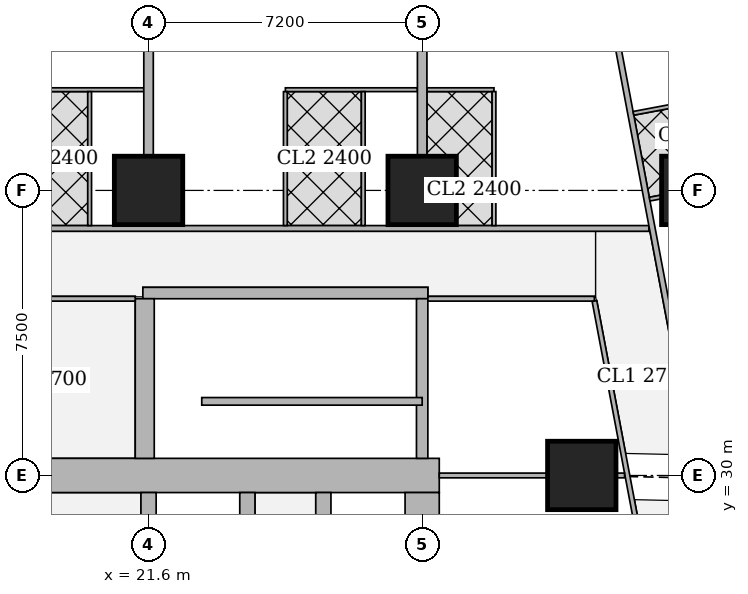
"""IFC4 building model, lengths in metres.
Left out: names, types, materials, properties, quantities, classifications, styles, units other than length and angle.
Written with IfcOpenShell. Run it as: python <this file> out.ifc"""

import sys

from ifc_helpers import new_model, si_unit, direction, frame, frame_2d, origin, origin_2d, place, context, subcontext, project, spatial, rectangle, extrude, element, fill, save


model = new_model("IFC4")
c1 = context("Model", 3, precision=1e-05, world=origin(), true_north=direction((0.0, 1.0)))
c2 = subcontext(c1, "Body", "Model", "MODEL_VIEW")
j1 = project(units=[si_unit("LENGTHUNIT", "METRE"), si_unit("PLANEANGLEUNIT", "RADIAN")], contexts=[c1])
p1 = place(None, origin())
s1 = spatial("IfcSite", under=j1, at=p1, CompositionType="ELEMENT")
p2 = place(p1, origin())
s2 = spatial("IfcBuilding", under=s1, at=p2, CompositionType="ELEMENT")
p3 = place(p2, frame((0.0, 0.0, 42.5)))
s3 = spatial("IfcBuildingStorey", under=s2, at=p3, CompositionType="ELEMENT", Elevation=42.5)
for number, where, z_axis, x_axis in (
    (1, (33.0, 30.0, 0.0), (0.0, 0.0, 1.0), (1.0, 0.0, 0.0)),
    (2, (21.6, 37.5, 0.0), (0.0, 0.0, 1.0), (1.0, 0.0, 0.0)),
    (3, (28.8, 37.5, 0.0), (0.0, 0.0, 1.0), (1.0, 0.0, 0.0)),
    (4, (36.0, 37.5, 0.0), (0.0, 0.0, 1.0), (1.0, 0.0, 0.0)),
):
    element("IfcColumn", number, at=place(p3, frame(where, z_axis=z_axis, x_axis=x_axis)), inside=s3, PredefinedType="COLUMN", context=c2, shape_type="SweptSolid", body=[
        extrude(rectangle(XDim=1.8, YDim=1.8, at=origin_2d()), origin(), (0.0, 0.0, 1.0), 3.75),
    ])
p4 = place(p3, frame((13.95, 30.0, 0.0), z_axis=(0.0, 0.0, 1.0), x_axis=(1.0, 0.0, 0.0)))
e5 = element("IfcWall", 5, at=p4, inside=s3, PredefinedType="SHEAR", context=c2, shape_type="SweptSolid", body=[
    extrude(rectangle(XDim=15.3, YDim=0.9, at=frame_2d((7.65, 0.0))), origin(), (0.0, 0.0, 1.0), 3.75),
])
p5 = place(p4, frame((4.45, 0.0, 0.0)))
e6 = element("IfcOpeningElement", 6, at=p5, cuts=e5, PredefinedType="OPENING", context=c2, shape_type="SweptSolid", body=[
    extrude(rectangle(XDim=1.8, YDim=2.1, at=frame_2d((0.9, 1.05))), frame((0.0, 0.46, 0.0), z_axis=(0.0, -1.0, 0.0), x_axis=(1.0, 0.0, 0.0)), (0.0, 0.0, 1.0), 0.92),
])
p6 = place(p4, frame((10.7, 0.0, 0.0)))
e7 = element("IfcOpeningElement", 7, at=p6, cuts=e5, PredefinedType="OPENING", context=c2, shape_type="SweptSolid", body=[
    extrude(rectangle(XDim=1.1, YDim=2.1, at=frame_2d((0.55, 1.05))), frame((0.0, 0.46, 0.0), z_axis=(0.0, -1.0, 0.0), x_axis=(1.0, 0.0, 0.0)), (0.0, 0.0, 1.0), 0.92),
])
p7 = place(p3, frame((28.8, 15.45, 0.0), z_axis=(0.0, 0.0, 1.0), x_axis=(0.0, 1.0, 0.0)))
e8 = element("IfcWall", 8, at=p7, inside=s3, PredefinedType="SHEAR", context=c2, shape_type="SweptSolid", body=[
    extrude(rectangle(XDim=14.1, YDim=0.9, at=frame_2d((7.05, 0.0))), origin(), (0.0, 0.0, 1.0), 3.75),
])
for number, where, z_axis, x_axis in (
    (9, (21.6, 15.45, 0.0), (0.0, 0.0, 1.0), (0.0, 1.0, 0.0)),
    (10, (24.2, 15.45, 0.0), (0.0, 0.0, 1.0), (0.0, 1.0, 0.0)),
):
    element("IfcWall", number, at=place(p3, frame(where, z_axis=z_axis, x_axis=x_axis)), inside=s3, PredefinedType="SHEAR", context=c2, shape_type="SweptSolid", body=[
        extrude(rectangle(XDim=14.1, YDim=0.4, at=frame_2d((7.05, 0.0))), origin(), (0.0, 0.0, 1.0), 3.75),
    ])
p8 = place(p3, frame((26.2, 26.45, 0.0), z_axis=(0.0, 0.0, 1.0), x_axis=(0.0, 1.0, 0.0)))
e11 = element("IfcWall", 11, at=p8, inside=s3, PredefinedType="SHEAR", context=c2, shape_type="SweptSolid", body=[
    extrude(rectangle(XDim=3.1, YDim=0.4, at=frame_2d((1.55, 0.0))), origin(), (0.0, 0.0, 1.0), 3.75),
])
p9 = place(p8, frame((1.075, 0.0, 0.0)))
e12 = element("IfcOpeningElement", 12, at=p9, cuts=e11, PredefinedType="OPENING", context=c2, shape_type="SweptSolid", body=[
    extrude(rectangle(XDim=1.2, YDim=2.1, at=frame_2d((0.6, 1.05))), frame((0.0, 0.21, 0.0), z_axis=(0.0, -1.0, 0.0), x_axis=(1.0, 0.0, 0.0)), (0.0, 0.0, 1.0), 0.42),
])
p10 = place(p3, frame((21.45, 34.8, 0.0), z_axis=(0.0, 0.0, 1.0), x_axis=(1.0, 0.0, 0.0)))
e13 = element("IfcWall", 13, at=p10, inside=s3, PredefinedType="SHEAR", context=c2, shape_type="SweptSolid", body=[
    extrude(rectangle(XDim=7.5, YDim=0.3, at=frame_2d((3.75, 0.0))), origin(), (0.0, 0.0, 1.0), 3.75),
])
p11 = place(p10, frame((0.5, 0.0, 0.0)))
e14 = element("IfcOpeningElement", 14, at=p11, cuts=e13, PredefinedType="OPENING", context=c2, shape_type="SweptSolid", body=[
    extrude(rectangle(XDim=1.1, YDim=2.1, at=frame_2d((0.55, 1.05))), frame((0.0, 0.16, 0.0), z_axis=(0.0, -1.0, 0.0), x_axis=(1.0, 0.0, 0.0)), (0.0, 0.0, 1.0), 0.32),
])
p12 = place(p3, frame((21.5, 30.45, 0.0), z_axis=(0.0, 0.0, 1.0), x_axis=(0.0, 1.0, 0.0)))
e15 = element("IfcWall", 15, at=p12, inside=s3, PredefinedType="SHEAR", context=c2, shape_type="SweptSolid", body=[
    extrude(rectangle(XDim=4.2, YDim=0.5, at=frame_2d((2.1, 0.0))), origin(), (0.0, 0.0, 1.0), 3.75),
])
p13 = place(p3, frame((28.8, 30.45, 0.0), z_axis=(0.0, 0.0, 1.0), x_axis=(0.0, 1.0, 0.0)))
e16 = element("IfcWall", 16, at=p13, inside=s3, PredefinedType="SHEAR", context=c2, shape_type="SweptSolid", body=[
    extrude(rectangle(XDim=4.2, YDim=0.3, at=frame_2d((2.1, 0.0))), origin(), (0.0, 0.0, 1.0), 3.75),
])
p14 = place(p3, frame((8.35, 36.5, 0.0), z_axis=(0.0, 0.0, 1.0), x_axis=(1.0, 0.0, 0.0)))
e17 = element("IfcWall", 17, at=p14, inside=s3, PredefinedType="SOLIDWALL", context=c2, shape_type="SweptSolid", body=[
    extrude(rectangle(XDim=26.415, YDim=0.15, at=frame_2d((13.208, 0.0))), origin(), (0.0, 0.0, 1.0), 3.5),
])
p15 = place(p14, frame((3.383, 0.0, 0.0)))
e18 = element("IfcOpeningElement", 18, at=p15, cuts=e17, PredefinedType="OPENING", context=c2, shape_type="SweptSolid", body=[
    extrude(rectangle(XDim=1.0, YDim=2.1, at=frame_2d((0.5, 1.05))), frame((0.0, 0.085, 0.0), z_axis=(0.0, -1.0, 0.0), x_axis=(1.0, 0.0, 0.0)), (0.0, 0.0, 1.0), 0.17),
])
p16 = place(p14, frame((7.65, 0.0, 0.0)))
e19 = element("IfcOpeningElement", 19, at=p16, cuts=e17, PredefinedType="OPENING", context=c2, shape_type="SweptSolid", body=[
    extrude(rectangle(XDim=1.0, YDim=2.1, at=frame_2d((0.5, 1.05))), frame((0.0, 0.085, 0.0), z_axis=(0.0, -1.0, 0.0), x_axis=(1.0, 0.0, 0.0)), (0.0, 0.0, 1.0), 0.17),
])
p17 = place(p14, frame((14.85, 0.0, 0.0)))
e20 = element("IfcOpeningElement", 20, at=p17, cuts=e17, PredefinedType="OPENING", context=c2, shape_type="SweptSolid", body=[
    extrude(rectangle(XDim=1.0, YDim=2.1, at=frame_2d((0.5, 1.05))), frame((0.0, 0.085, 0.0), z_axis=(0.0, -1.0, 0.0), x_axis=(1.0, 0.0, 0.0)), (0.0, 0.0, 1.0), 0.17),
])
p18 = place(p14, frame((23.923, 0.0, 0.0)))
e21 = element("IfcOpeningElement", 21, at=p18, cuts=e17, PredefinedType="OPENING", context=c2, shape_type="SweptSolid", body=[
    extrude(rectangle(XDim=1.0, YDim=2.1, at=frame_2d((0.5, 1.05))), frame((0.0, 0.085, 0.0), z_axis=(0.0, -1.0, 0.0), x_axis=(1.0, 0.0, 0.0)), (0.0, 0.0, 1.0), 0.17),
])
p19 = place(p3, frame((33.68, 42.723, 0.0), z_axis=(0.0, 0.0, 1.0), x_axis=(0.185624129307, -0.98262082342, 0.0)))
e22 = element("IfcWall", 22, at=p19, inside=s3, PredefinedType="SOLIDWALL", context=c2, shape_type="SweptSolid", body=[
    extrude(rectangle(XDim=41.051, YDim=0.15, at=frame_2d((20.526, 0.0))), origin(), (0.0, 0.0, 1.0), 2.5),
])
p20 = place(p19, frame((7.73, 0.0, 0.0)))
e23 = element("IfcOpeningElement", 23, at=p20, cuts=e22, PredefinedType="OPENING", context=c2, shape_type="SweptSolid", body=[
    extrude(rectangle(XDim=1.0, YDim=2.1, at=frame_2d((0.5, 1.05))), frame((0.0, 0.085, 0.0), z_axis=(0.0, -1.0, 0.0), x_axis=(1.0, 0.0, 0.0)), (0.0, 0.0, 1.0), 0.17),
])
p21 = place(p19, frame((12.307, 0.0, 0.0)))
e24 = element("IfcOpeningElement", 24, at=p21, cuts=e22, PredefinedType="OPENING", context=c2, shape_type="SweptSolid", body=[
    extrude(rectangle(XDim=1.0, YDim=2.1, at=frame_2d((0.5, 1.05))), frame((0.0, 0.085, 0.0), z_axis=(0.0, -1.0, 0.0), x_axis=(1.0, 0.0, 0.0)), (0.0, 0.0, 1.0), 0.17),
])
p22 = place(p19, frame((19.938, 0.0, 0.0)))
e25 = element("IfcOpeningElement", 25, at=p22, cuts=e22, PredefinedType="OPENING", context=c2, shape_type="SweptSolid", body=[
    extrude(rectangle(XDim=1.0, YDim=2.1, at=frame_2d((0.5, 1.05))), frame((0.0, 0.085, 0.0), z_axis=(0.0, -1.0, 0.0), x_axis=(1.0, 0.0, 0.0)), (0.0, 0.0, 1.0), 0.17),
])
p23 = place(p19, frame((32.193, 0.0, 0.0)))
e26 = element("IfcOpeningElement", 26, at=p23, cuts=e22, PredefinedType="OPENING", context=c2, shape_type="SweptSolid", body=[
    extrude(rectangle(XDim=1.0, YDim=2.1, at=frame_2d((0.5, 1.05))), frame((0.0, 0.085, 0.0), z_axis=(0.0, -1.0, 0.0), x_axis=(1.0, 0.0, 0.0)), (0.0, 0.0, 1.0), 0.17),
])
p24 = place(p3, frame((37.823, 40.182, 0.0), z_axis=(0.0, 0.0, 1.0), x_axis=(-0.98263926043, -0.185526504472, 0.0)))
e27 = element("IfcWall", 27, at=p24, inside=s3, PredefinedType="PARTITIONING", context=c2, shape_type="SweptSolid", body=[
    extrude(rectangle(XDim=3.524, YDim=0.1, at=frame_2d((1.762, 0.0))), origin(), (0.0, 0.0, 1.0), 3.5),
])
p25 = place(p3, frame((35.09, 37.328, 0.0), z_axis=(0.0, 0.0, 1.0), x_axis=(-0.982961380226, -0.183812200315, 0.0)))
e28 = element("IfcWall", 28, at=p25, inside=s3, PredefinedType="PARTITIONING", context=c2, shape_type="SweptSolid", body=[
    extrude(rectangle(XDim=0.31, YDim=0.1, at=frame_2d((0.155, 0.0))), origin(), (0.0, 0.0, 1.0), 3.5),
])
p26 = place(p3, frame((18.0, 40.15, 0.0), z_axis=(0.0, 0.0, 1.0), x_axis=(1.0, 0.0, 0.0)))
e29 = element("IfcWall", 29, at=p26, inside=s3, PredefinedType="PARTITIONING", context=c2, shape_type="SweptSolid", body=[
    extrude(rectangle(XDim=3.475, YDim=0.1, at=frame_2d((1.738, 0.0))), origin(), (0.0, 0.0, 1.0), 3.5),
])
p27 = place(p26, frame((0.575, 0.0, 0.0)))
e30 = element("IfcOpeningElement", 30, at=p27, cuts=e29, PredefinedType="OPENING", context=c2, shape_type="SweptSolid", body=[
    extrude(rectangle(XDim=0.9, YDim=2.1, at=frame_2d((0.45, 1.05))), frame((0.0, 0.06, 0.0), z_axis=(0.0, -1.0, 0.0), x_axis=(1.0, 0.0, 0.0)), (0.0, 0.0, 1.0), 0.12),
])
p28 = place(p26, frame((2.375, 0.0, 0.0)))
e31 = element("IfcOpeningElement", 31, at=p28, cuts=e29, PredefinedType="OPENING", context=c2, shape_type="SweptSolid", body=[
    extrude(rectangle(XDim=0.9, YDim=2.1, at=frame_2d((0.45, 1.05))), frame((0.0, 0.06, 0.0), z_axis=(0.0, -1.0, 0.0), x_axis=(1.0, 0.0, 0.0)), (0.0, 0.0, 1.0), 0.12),
])
p29 = place(p3, frame((20.05, 36.575, 0.0), z_axis=(0.0, 0.0, 1.0), x_axis=(0.0, 1.0, 0.0)))
e32 = element("IfcWall", 32, at=p29, inside=s3, PredefinedType="PARTITIONING", context=c2, shape_type="SweptSolid", body=[
    extrude(rectangle(XDim=3.525, YDim=0.1, at=frame_2d((1.763, 0.0))), origin(), (0.0, 0.0, 1.0), 3.5),
])
p30 = place(p3, frame((25.2, 40.15, 0.0), z_axis=(0.0, 0.0, 1.0), x_axis=(1.0, 0.0, 0.0)))
e33 = element("IfcWall", 33, at=p30, inside=s3, PredefinedType="PARTITIONING", context=c2, shape_type="SweptSolid", body=[
    extrude(rectangle(XDim=3.475, YDim=0.1, at=frame_2d((1.738, 0.0))), origin(), (0.0, 0.0, 1.0), 3.5),
])
p31 = place(p30, frame((0.575, 0.0, 0.0)))
e34 = element("IfcOpeningElement", 34, at=p31, cuts=e33, PredefinedType="OPENING", context=c2, shape_type="SweptSolid", body=[
    extrude(rectangle(XDim=0.9, YDim=2.1, at=frame_2d((0.45, 1.05))), frame((0.0, 0.06, 0.0), z_axis=(0.0, -1.0, 0.0), x_axis=(1.0, 0.0, 0.0)), (0.0, 0.0, 1.0), 0.12),
])
p32 = place(p30, frame((2.375, 0.0, 0.0)))
e35 = element("IfcOpeningElement", 35, at=p32, cuts=e33, PredefinedType="OPENING", context=c2, shape_type="SweptSolid", body=[
    extrude(rectangle(XDim=0.9, YDim=2.1, at=frame_2d((0.45, 1.05))), frame((0.0, 0.06, 0.0), z_axis=(0.0, -1.0, 0.0), x_axis=(1.0, 0.0, 0.0)), (0.0, 0.0, 1.0), 0.12),
])
for number, where, z_axis, x_axis in (
    (36, (25.2, 36.575, 0.0), (0.0, 0.0, 1.0), (0.0, 1.0, 0.0)),
    (37, (27.25, 36.575, 0.0), (0.0, 0.0, 1.0), (0.0, 1.0, 0.0)),
):
    element("IfcWall", number, at=place(p3, frame(where, z_axis=z_axis, x_axis=x_axis)), inside=s3, PredefinedType="PARTITIONING", context=c2, shape_type="SweptSolid", body=[
        extrude(rectangle(XDim=3.525, YDim=0.1, at=frame_2d((1.763, 0.0))), origin(), (0.0, 0.0, 1.0), 3.5),
    ])
p33 = place(p3, frame((21.6, 38.401, 0.0), z_axis=(0.0, 0.0, 1.0), x_axis=(0.0, 1.0, 0.0)))
e38 = element("IfcWall", 38, at=p33, inside=s3, PredefinedType="SOLIDWALL", context=c2, shape_type="SweptSolid", body=[
    extrude(rectangle(XDim=2.949, YDim=0.25, at=frame_2d((1.475, 0.0))), origin(), (0.0, 0.0, 1.0), 3.5),
])
p34 = place(p3, frame((28.925, 40.15, 0.0), z_axis=(0.0, 0.0, 1.0), x_axis=(1.0, 0.0, 0.0)))
e39 = element("IfcWall", 39, at=p34, inside=s3, PredefinedType="PARTITIONING", context=c2, shape_type="SweptSolid", body=[
    extrude(rectangle(XDim=1.765, YDim=0.1, at=frame_2d((0.882, 0.0))), origin(), (0.0, 0.0, 1.0), 3.5),
])
p35 = place(p34, frame((0.375, 0.0, 0.0)))
e40 = element("IfcOpeningElement", 40, at=p35, cuts=e39, PredefinedType="OPENING", context=c2, shape_type="SweptSolid", body=[
    extrude(rectangle(XDim=0.9, YDim=2.1, at=frame_2d((0.45, 1.05))), frame((0.0, 0.06, 0.0), z_axis=(0.0, -1.0, 0.0), x_axis=(1.0, 0.0, 0.0)), (0.0, 0.0, 1.0), 0.12),
])
p36 = place(p3, frame((30.69, 36.575, 0.0), z_axis=(0.0, 0.0, 1.0), x_axis=(0.0, 1.0, 0.0)))
e41 = element("IfcWall", 41, at=p36, inside=s3, PredefinedType="PARTITIONING", context=c2, shape_type="SweptSolid", body=[
    extrude(rectangle(XDim=3.525, YDim=0.1, at=frame_2d((1.763, 0.0))), origin(), (0.0, 0.0, 1.0), 3.5),
])
p37 = place(p3, frame((28.8, 38.401, 0.0), z_axis=(0.0, 0.0, 1.0), x_axis=(0.0, 1.0, 0.0)))
e42 = element("IfcWall", 42, at=p37, inside=s3, PredefinedType="SOLIDWALL", context=c2, shape_type="SweptSolid", body=[
    extrude(rectangle(XDim=2.949, YDim=0.25, at=frame_2d((1.475, 0.0))), origin(), (0.0, 0.0, 1.0), 3.5),
])
p38 = place(p3, frame((10.413, 34.65, 0.0), z_axis=(0.0, 0.0, 1.0), x_axis=(1.0, 0.0, 0.0)))
e43 = element("IfcWall", 43, at=p38, inside=s3, PredefinedType="PARTITIONING", context=c2, shape_type="SweptSolid", body=[
    extrude(rectangle(XDim=10.837, YDim=0.125, at=frame_2d((5.418, 0.0))), origin(), (0.0, 0.0, 1.0), 3.5),
])
p39 = place(p38, frame((7.487, 0.0, 0.0)))
e44 = element("IfcOpeningElement", 44, at=p39, cuts=e43, PredefinedType="OPENING", context=c2, shape_type="SweptSolid", body=[
    extrude(rectangle(XDim=1.8, YDim=2.1, at=frame_2d((0.9, 1.05))), frame((0.0, 0.073, 0.0), z_axis=(0.0, -1.0, 0.0), x_axis=(1.0, 0.0, 0.0)), (0.0, 0.0, 1.0), 0.145),
])
p40 = place(p3, frame((28.95, 34.65, 0.0), z_axis=(0.0, 0.0, 1.0), x_axis=(1.0, 0.0, 0.0)))
e45 = element("IfcWall", 45, at=p40, inside=s3, PredefinedType="PARTITIONING", context=c2, shape_type="SweptSolid", body=[
    extrude(rectangle(XDim=4.381, YDim=0.125, at=frame_2d((2.19, 0.0))), origin(), (0.0, 0.0, 1.0), 3.5),
])
p41 = place(p3, frame((36.861, 15.913, 0.0), z_axis=(0.0, 0.0, 1.0), x_axis=(-0.185588307143, 0.982627589808, 0.0)))
e46 = element("IfcWall", 46, at=p41, inside=s3, PredefinedType="PARTITIONING", context=c2, shape_type="SweptSolid", body=[
    extrude(rectangle(XDim=19.005, YDim=0.125, at=frame_2d((9.502, 0.0))), origin(), (0.0, 0.0, 1.0), 2.5),
])
p42 = place(p41, frame((0.25, 0.0, 0.0)))
e47 = element("IfcOpeningElement", 47, at=p42, cuts=e46, PredefinedType="OPENING", context=c2, shape_type="SweptSolid", body=[
    extrude(rectangle(XDim=1.0, YDim=2.1, at=frame_2d((0.5, 1.05))), frame((0.0, 0.073, 0.0), z_axis=(0.0, -1.0, 0.0), x_axis=(1.0, 0.0, 0.0)), (0.0, 0.0, 1.0), 0.145),
])
p43 = place(p41, frame((7.527, 0.0, 0.0)))
e48 = element("IfcOpeningElement", 48, at=p43, cuts=e46, PredefinedType="OPENING", context=c2, shape_type="SweptSolid", body=[
    extrude(rectangle(XDim=1.0, YDim=2.1, at=frame_2d((0.5, 1.05))), frame((0.0, 0.073, 0.0), z_axis=(0.0, -1.0, 0.0), x_axis=(1.0, 0.0, 0.0)), (0.0, 0.0, 1.0), 0.145),
])
p44 = place(p41, frame((15.5, 0.0, 0.0)))
e49 = element("IfcOpeningElement", 49, at=p44, cuts=e46, PredefinedType="OPENING", context=c2, shape_type="SweptSolid", body=[
    extrude(rectangle(XDim=1.0, YDim=2.1, at=frame_2d((0.5, 1.05))), frame((0.0, 0.073, 0.0), z_axis=(0.0, -1.0, 0.0), x_axis=(1.0, 0.0, 0.0)), (0.0, 0.0, 1.0), 0.145),
])
p45 = place(p3, frame((29.25, 30.0, 0.0), z_axis=(0.0, 0.0, 1.0), x_axis=(1.0, 0.0, 0.0)))
e50 = element("IfcWall", 50, at=p45, inside=s3, PredefinedType="PARTITIONING", context=c2, shape_type="SweptSolid", body=[
    extrude(rectangle(XDim=2.849, YDim=0.125, at=frame_2d((1.425, 0.0))), origin(), (0.0, 0.0, 1.0), 3.5),
])
p46 = place(p3, frame((33.901, 30.0, 0.0), z_axis=(0.0, 0.0, 1.0), x_axis=(1.0, 0.0, 0.0)))
e51 = element("IfcWall", 51, at=p46, inside=s3, PredefinedType="PARTITIONING", context=c2, shape_type="SweptSolid", body=[
    extrude(rectangle(XDim=0.224, YDim=0.125, at=frame_2d((0.112, 0.0))), origin(), (0.0, 0.0, 1.0), 2.5),
])
p47 = place(p3, frame((23.0, 31.95, 0.0), z_axis=(0.0, 0.0, 1.0), x_axis=(1.0, 0.0, 0.0)))
e52 = element("IfcWall", 52, at=p47, inside=s3, PredefinedType="SHEAR", context=c2, shape_type="SweptSolid", body=[
    extrude(rectangle(XDim=5.8, YDim=0.2, at=frame_2d((2.9, 0.0))), origin(), (0.0, 0.0, 1.0), 3.75),
])
p48 = place(p20, origin())
e53 = element("IfcDoor", 53, at=p48, inside=s3, OperationType="SINGLE_SWING_RIGHT", PredefinedType="DOOR", context=c2, shape_type="SweptSolid", body=[
    extrude(rectangle(XDim=1.0, YDim=2.1, at=frame_2d((0.5, 1.05))), frame((0.0, 0.025, 0.0), z_axis=(0.0, -1.0, 0.0), x_axis=(1.0, 0.0, 0.0)), (0.0, 0.0, 1.0), 0.05),
])
fill(e23, e53)
p49 = place(p27, origin())
e54 = element("IfcDoor", 54, at=p49, inside=s3, OperationType="SINGLE_SWING_RIGHT", PredefinedType="DOOR", context=c2, shape_type="SweptSolid", body=[
    extrude(rectangle(XDim=0.9, YDim=2.1, at=frame_2d((0.45, 1.05))), frame((0.0, 0.025, 0.0), z_axis=(0.0, -1.0, 0.0), x_axis=(1.0, 0.0, 0.0)), (0.0, 0.0, 1.0), 0.05),
])
fill(e30, e54)
p50 = place(p28, origin())
e55 = element("IfcDoor", 55, at=p50, inside=s3, OperationType="SINGLE_SWING_LEFT", PredefinedType="DOOR", context=c2, shape_type="SweptSolid", body=[
    extrude(rectangle(XDim=0.9, YDim=2.1, at=frame_2d((0.45, 1.05))), frame((0.0, 0.025, 0.0), z_axis=(0.0, -1.0, 0.0), x_axis=(1.0, 0.0, 0.0)), (0.0, 0.0, 1.0), 0.05),
])
fill(e31, e55)
p51 = place(p31, origin())
e56 = element("IfcDoor", 56, at=p51, inside=s3, OperationType="SINGLE_SWING_RIGHT", PredefinedType="DOOR", context=c2, shape_type="SweptSolid", body=[
    extrude(rectangle(XDim=0.9, YDim=2.1, at=frame_2d((0.45, 1.05))), frame((0.0, 0.025, 0.0), z_axis=(0.0, -1.0, 0.0), x_axis=(1.0, 0.0, 0.0)), (0.0, 0.0, 1.0), 0.05),
])
fill(e34, e56)
p52 = place(p32, origin())
e57 = element("IfcDoor", 57, at=p52, inside=s3, OperationType="SINGLE_SWING_LEFT", PredefinedType="DOOR", context=c2, shape_type="SweptSolid", body=[
    extrude(rectangle(XDim=0.9, YDim=2.1, at=frame_2d((0.45, 1.05))), frame((0.0, 0.025, 0.0), z_axis=(0.0, -1.0, 0.0), x_axis=(1.0, 0.0, 0.0)), (0.0, 0.0, 1.0), 0.05),
])
fill(e35, e57)
p53 = place(p17, origin())
e58 = element("IfcDoor", 58, at=p53, inside=s3, OperationType="SINGLE_SWING_RIGHT", PredefinedType="DOOR", context=c2, shape_type="SweptSolid", body=[
    extrude(rectangle(XDim=1.0, YDim=2.1, at=frame_2d((0.5, 1.05))), frame((0.0, 0.025, 0.0), z_axis=(0.0, -1.0, 0.0), x_axis=(1.0, 0.0, 0.0)), (0.0, 0.0, 1.0), 0.05),
])
fill(e20, e58)
p54 = place(p35, origin())
e59 = element("IfcDoor", 59, at=p54, inside=s3, OperationType="SINGLE_SWING_RIGHT", PredefinedType="DOOR", context=c2, shape_type="SweptSolid", body=[
    extrude(rectangle(XDim=0.9, YDim=2.1, at=frame_2d((0.45, 1.05))), frame((0.0, 0.025, 0.0), z_axis=(0.0, -1.0, 0.0), x_axis=(1.0, 0.0, 0.0)), (0.0, 0.0, 1.0), 0.05),
])
fill(e40, e59)
p55 = place(p18, origin())
e60 = element("IfcDoor", 60, at=p55, inside=s3, OperationType="SINGLE_SWING_RIGHT", PredefinedType="DOOR", context=c2, shape_type="SweptSolid", body=[
    extrude(rectangle(XDim=1.0, YDim=2.1, at=frame_2d((0.5, 1.05))), frame((0.0, 0.025, 0.0), z_axis=(0.0, -1.0, 0.0), x_axis=(1.0, 0.0, 0.0)), (0.0, 0.0, 1.0), 0.05),
])
fill(e21, e60)
p56 = place(p39, origin())
e61 = element("IfcDoor", 61, at=p56, inside=s3, OperationType="DOUBLE_DOOR_SINGLE_SWING", PredefinedType="DOOR", context=c2, shape_type="SweptSolid", body=[
    extrude(rectangle(XDim=1.8, YDim=2.1, at=frame_2d((0.9, 1.05))), frame((0.0, 0.025, 0.0), z_axis=(0.0, -1.0, 0.0), x_axis=(1.0, 0.0, 0.0)), (0.0, 0.0, 1.0), 0.05),
])
fill(e44, e61)
p57 = place(p44, origin())
e62 = element("IfcDoor", 62, at=p57, inside=s3, OperationType="SINGLE_SWING_LEFT", PredefinedType="DOOR", context=c2, shape_type="SweptSolid", body=[
    extrude(rectangle(XDim=1.0, YDim=2.1, at=frame_2d((0.5, 1.05))), frame((0.0, 0.025, 0.0), z_axis=(0.0, -1.0, 0.0), x_axis=(1.0, 0.0, 0.0)), (0.0, 0.0, 1.0), 0.05),
])
fill(e49, e62)
p58 = place(p5, origin())
e63 = element("IfcDoor", 63, at=p58, inside=s3, OperationType="DOUBLE_DOOR_SINGLE_SWING", PredefinedType="DOOR", context=c2, shape_type="SweptSolid", body=[
    extrude(rectangle(XDim=1.8, YDim=2.1, at=frame_2d((0.9, 1.05))), frame((0.0, 0.025, 0.0), z_axis=(0.0, -1.0, 0.0), x_axis=(1.0, 0.0, 0.0)), (0.0, 0.0, 1.0), 0.05),
])
fill(e6, e63)
p59 = place(p6, origin())
e64 = element("IfcDoor", 64, at=p59, inside=s3, OperationType="SINGLE_SWING_LEFT", PredefinedType="DOOR", context=c2, shape_type="SweptSolid", body=[
    extrude(rectangle(XDim=1.1, YDim=2.1, at=frame_2d((0.55, 1.05))), frame((0.0, 0.025, 0.0), z_axis=(0.0, -1.0, 0.0), x_axis=(1.0, 0.0, 0.0)), (0.0, 0.0, 1.0), 0.05),
])
fill(e7, e64)
p60 = place(p11, origin())
e65 = element("IfcDoor", 65, at=p60, inside=s3, OperationType="SINGLE_SWING_RIGHT", PredefinedType="DOOR", context=c2, shape_type="SweptSolid", body=[
    extrude(rectangle(XDim=1.1, YDim=2.1, at=frame_2d((0.55, 1.05))), frame((0.0, 0.025, 0.0), z_axis=(0.0, -1.0, 0.0), x_axis=(1.0, 0.0, 0.0)), (0.0, 0.0, 1.0), 0.05),
])
fill(e14, e65)
save(model, sys.argv[1])
